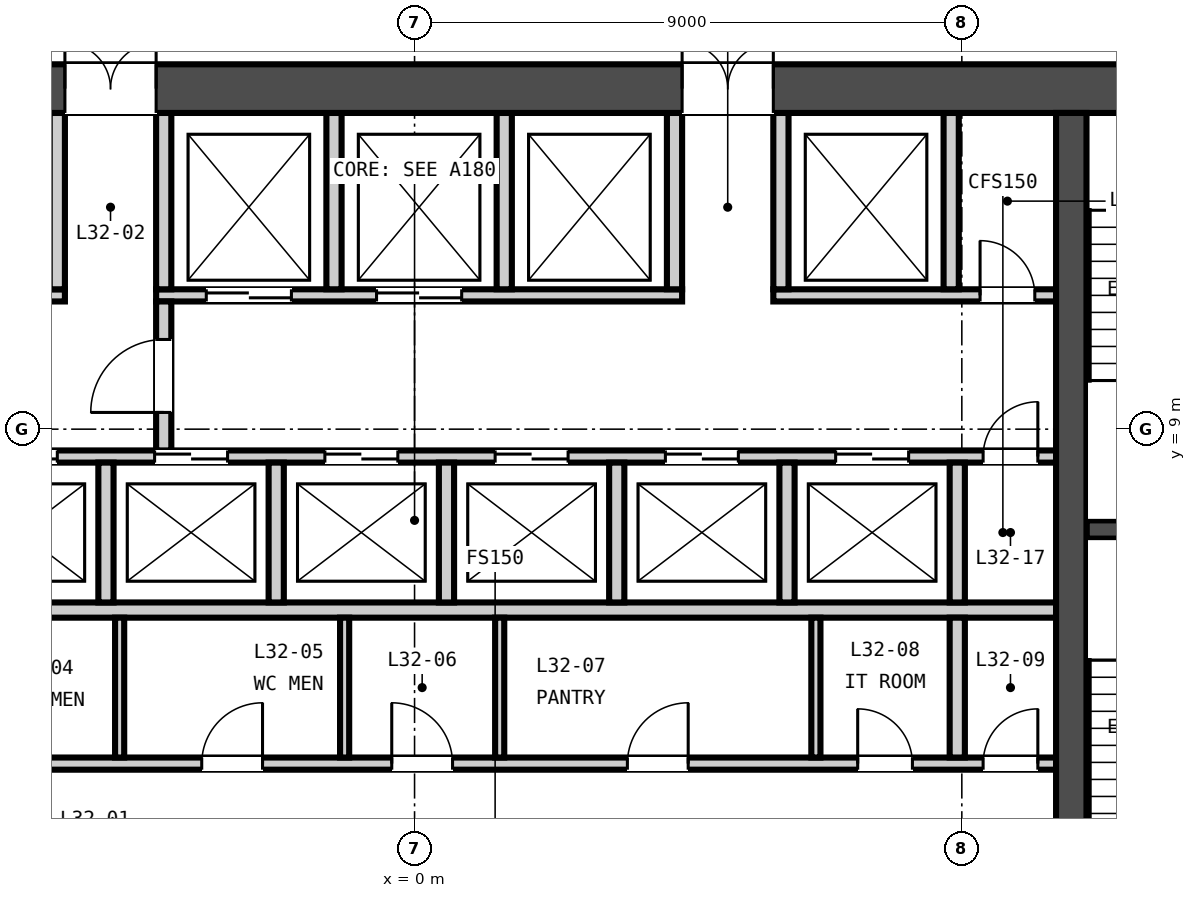
"""IFC4 building model, lengths in metres.
Left out: names, types, materials, properties, quantities, classifications, styles, units other than length and angle.
Written with IfcOpenShell. Run it as: python <this file> out.ifc"""

import sys

from ifc_helpers import new_model, si_unit, direction, frame, frame_2d, origin, place, context, subcontext, project, spatial, rectangle, extrude, element, fill, save


model = new_model("IFC4")
c1 = context("Model", 3, precision=1e-05, world=origin(), true_north=direction((0.0, 1.0)))
c2 = subcontext(c1, "Body", "Model", "MODEL_VIEW")
j1 = project(units=[si_unit("LENGTHUNIT", "METRE"), si_unit("PLANEANGLEUNIT", "RADIAN")], contexts=[c1])
p1 = place(None, origin())
s1 = spatial("IfcSite", under=j1, at=p1, CompositionType="ELEMENT")
p2 = place(p1, origin())
s2 = spatial("IfcBuilding", under=s1, at=p2, CompositionType="ELEMENT")
p3 = place(p2, frame((0.0, 0.0, 133.45)))
s3 = spatial("IfcBuildingStorey", under=s2, at=p3, CompositionType="ELEMENT", Elevation=133.45)
p4 = place(p3, frame((-15.0, 14.6, -0.15), z_axis=(0.0, 0.0, 1.0), x_axis=(1.0, 0.0, 0.0)))
e1 = element("IfcWall", 1, at=p4, inside=s3, PredefinedType="SOLIDWALL", context=c2, shape_type="SweptSolid", body=[
    extrude(rectangle(XDim=30.0, YDim=0.8, at=frame_2d((15.0, 0.0))), origin(), (0.0, 0.0, 1.0), 3.65),
])
p5 = place(p4, frame((9.25, 0.0, 0.15)))
e2 = element("IfcOpeningElement", 2, at=p5, cuts=e1, PredefinedType="OPENING", context=c2, shape_type="SweptSolid", body=[
    extrude(rectangle(XDim=1.5, YDim=2.1, at=frame_2d((0.75, 1.05))), frame((0.0, 0.41, 0.0), z_axis=(0.0, -1.0, 0.0), x_axis=(1.0, 0.0, 0.0)), (0.0, 0.0, 1.0), 0.82),
])
p6 = place(p4, frame((19.4, 0.0, 0.15)))
e3 = element("IfcOpeningElement", 3, at=p6, cuts=e1, PredefinedType="OPENING", context=c2, shape_type="SweptSolid", body=[
    extrude(rectangle(XDim=1.5, YDim=2.1, at=frame_2d((0.75, 1.05))), frame((0.0, 0.41, 0.0), z_axis=(0.0, -1.0, 0.0), x_axis=(1.0, 0.0, 0.0)), (0.0, 0.0, 1.0), 0.82),
])
p7 = place(p4, frame((1.5, 0.0, 0.15)))
e4 = element("IfcOpeningElement", 4, at=p7, cuts=e1, PredefinedType="OPENING", context=c2, shape_type="SweptSolid", body=[
    extrude(rectangle(XDim=1.2, YDim=2.1, at=frame_2d((0.6, 1.05))), frame((0.0, 0.41, 0.0), z_axis=(0.0, -1.0, 0.0), x_axis=(1.0, 0.0, 0.0)), (0.0, 0.0, 1.0), 0.82),
])
p8 = place(p4, frame((27.3, 0.0, 0.15)))
e5 = element("IfcOpeningElement", 5, at=p8, cuts=e1, PredefinedType="OPENING", context=c2, shape_type="SweptSolid", body=[
    extrude(rectangle(XDim=1.2, YDim=2.1, at=frame_2d((0.6, 1.05))), frame((0.0, 0.41, 0.0), z_axis=(0.0, -1.0, 0.0), x_axis=(1.0, 0.0, 0.0)), (0.0, 0.0, 1.0), 0.82),
])
p9 = place(p3, frame((10.8, 0.8, -0.15), z_axis=(0.0, 0.0, 1.0), x_axis=(0.0, 1.0, 0.0)))
e6 = element("IfcWall", 6, at=p9, inside=s3, PredefinedType="SOLIDWALL", context=c2, shape_type="SweptSolid", body=[
    extrude(rectangle(XDim=13.4, YDim=0.5, at=frame_2d((6.7, 0.0))), origin(), (0.0, 0.0, 1.0), 3.65),
])
p10 = place(p3, frame((-10.55, 3.5, 0.0), z_axis=(0.0, 0.0, 1.0), x_axis=(1.0, 0.0, 0.0)))
e7 = element("IfcWall", 7, at=p10, inside=s3, PredefinedType="PARTITIONING", context=c2, shape_type="SweptSolid", body=[
    extrude(rectangle(XDim=21.1, YDim=0.2, at=frame_2d((10.55, 0.0))), origin(), (0.0, 0.0, 1.0), 3.5),
])
p11 = place(p10, frame((2.312, 0.0, 0.0)))
e8 = element("IfcOpeningElement", 8, at=p11, cuts=e7, PredefinedType="OPENING", context=c2, shape_type="SweptSolid", body=[
    extrude(rectangle(XDim=1.0, YDim=2.1, at=frame_2d((0.5, 1.05))), frame((0.0, 0.11, 0.0), z_axis=(0.0, -1.0, 0.0), x_axis=(1.0, 0.0, 0.0)), (0.0, 0.0, 1.0), 0.22),
])
p12 = place(p10, frame((7.05, 0.0, 0.0)))
e9 = element("IfcOpeningElement", 9, at=p12, cuts=e7, PredefinedType="OPENING", context=c2, shape_type="SweptSolid", body=[
    extrude(rectangle(XDim=1.0, YDim=2.1, at=frame_2d((0.5, 1.05))), frame((0.0, 0.11, 0.0), z_axis=(0.0, -1.0, 0.0), x_axis=(1.0, 0.0, 0.0)), (0.0, 0.0, 1.0), 0.22),
])
p13 = place(p10, frame((10.175, 0.0, 0.0)))
e10 = element("IfcOpeningElement", 10, at=p13, cuts=e7, PredefinedType="OPENING", context=c2, shape_type="SweptSolid", body=[
    extrude(rectangle(XDim=1.0, YDim=2.1, at=frame_2d((0.5, 1.05))), frame((0.0, 0.11, 0.0), z_axis=(0.0, -1.0, 0.0), x_axis=(1.0, 0.0, 0.0)), (0.0, 0.0, 1.0), 0.22),
])
p14 = place(p10, frame((14.05, 0.0, 0.0)))
e11 = element("IfcOpeningElement", 11, at=p14, cuts=e7, PredefinedType="OPENING", context=c2, shape_type="SweptSolid", body=[
    extrude(rectangle(XDim=1.0, YDim=2.1, at=frame_2d((0.5, 1.05))), frame((0.0, 0.11, 0.0), z_axis=(0.0, -1.0, 0.0), x_axis=(1.0, 0.0, 0.0)), (0.0, 0.0, 1.0), 0.22),
])
p15 = place(p10, frame((17.837, 0.0, 0.0)))
e12 = element("IfcOpeningElement", 12, at=p15, cuts=e7, PredefinedType="OPENING", context=c2, shape_type="SweptSolid", body=[
    extrude(rectangle(XDim=0.9, YDim=2.1, at=frame_2d((0.45, 1.05))), frame((0.0, 0.11, 0.0), z_axis=(0.0, -1.0, 0.0), x_axis=(1.0, 0.0, 0.0)), (0.0, 0.0, 1.0), 0.22),
])
p16 = place(p10, frame((19.9, 0.0, 0.0)))
e13 = element("IfcOpeningElement", 13, at=p16, cuts=e7, PredefinedType="OPENING", context=c2, shape_type="SweptSolid", body=[
    extrude(rectangle(XDim=0.9, YDim=2.1, at=frame_2d((0.45, 1.05))), frame((0.0, 0.11, 0.0), z_axis=(0.0, -1.0, 0.0), x_axis=(1.0, 0.0, 0.0)), (0.0, 0.0, 1.0), 0.22),
])
p17 = place(p3, frame((-10.55, 6.025, 0.0), z_axis=(0.0, 0.0, 1.0), x_axis=(1.0, 0.0, 0.0)))
e14 = element("IfcWall", 14, at=p17, inside=s3, PredefinedType="PARTITIONING", context=c2, shape_type="SweptSolid", body=[
    extrude(rectangle(XDim=21.1, YDim=0.25, at=frame_2d((10.55, 0.0))), origin(), (0.0, 0.0, 1.0), 3.5),
])
p18 = place(p3, frame((-10.55, 8.55, 0.0), z_axis=(0.0, 0.0, 1.0), x_axis=(1.0, 0.0, 0.0)))
e15 = element("IfcWall", 15, at=p18, inside=s3, PredefinedType="PARTITIONING", context=c2, shape_type="SweptSolid", body=[
    extrude(rectangle(XDim=21.1, YDim=0.2, at=frame_2d((10.55, 0.0))), origin(), (0.0, 0.0, 1.0), 3.5),
])
p19 = place(p18, frame((0.675, 0.0, 0.0)))
e16 = element("IfcOpeningElement", 16, at=p19, cuts=e15, PredefinedType="OPENING", context=c2, shape_type="SweptSolid", body=[
    extrude(rectangle(XDim=1.2, YDim=2.1, at=frame_2d((0.6, 1.05))), frame((0.0, 0.11, 0.0), z_axis=(0.0, -1.0, 0.0), x_axis=(1.0, 0.0, 0.0)), (0.0, 0.0, 1.0), 0.22),
])
p20 = place(p18, frame((3.475, 0.0, 0.0)))
e17 = element("IfcOpeningElement", 17, at=p20, cuts=e15, PredefinedType="OPENING", context=c2, shape_type="SweptSolid", body=[
    extrude(rectangle(XDim=1.2, YDim=2.1, at=frame_2d((0.6, 1.05))), frame((0.0, 0.11, 0.0), z_axis=(0.0, -1.0, 0.0), x_axis=(1.0, 0.0, 0.0)), (0.0, 0.0, 1.0), 0.22),
])
p21 = place(p18, frame((6.275, 0.0, 0.0)))
e18 = element("IfcOpeningElement", 18, at=p21, cuts=e15, PredefinedType="OPENING", context=c2, shape_type="SweptSolid", body=[
    extrude(rectangle(XDim=1.2, YDim=2.1, at=frame_2d((0.6, 1.05))), frame((0.0, 0.11, 0.0), z_axis=(0.0, -1.0, 0.0), x_axis=(1.0, 0.0, 0.0)), (0.0, 0.0, 1.0), 0.22),
])
p22 = place(p18, frame((9.075, 0.0, 0.0)))
e19 = element("IfcOpeningElement", 19, at=p22, cuts=e15, PredefinedType="OPENING", context=c2, shape_type="SweptSolid", body=[
    extrude(rectangle(XDim=1.2, YDim=2.1, at=frame_2d((0.6, 1.05))), frame((0.0, 0.11, 0.0), z_axis=(0.0, -1.0, 0.0), x_axis=(1.0, 0.0, 0.0)), (0.0, 0.0, 1.0), 0.22),
])
p23 = place(p18, frame((11.875, 0.0, 0.0)))
e20 = element("IfcOpeningElement", 20, at=p23, cuts=e15, PredefinedType="OPENING", context=c2, shape_type="SweptSolid", body=[
    extrude(rectangle(XDim=1.2, YDim=2.1, at=frame_2d((0.6, 1.05))), frame((0.0, 0.11, 0.0), z_axis=(0.0, -1.0, 0.0), x_axis=(1.0, 0.0, 0.0)), (0.0, 0.0, 1.0), 0.22),
])
p24 = place(p18, frame((14.675, 0.0, 0.0)))
e21 = element("IfcOpeningElement", 21, at=p24, cuts=e15, PredefinedType="OPENING", context=c2, shape_type="SweptSolid", body=[
    extrude(rectangle(XDim=1.2, YDim=2.1, at=frame_2d((0.6, 1.05))), frame((0.0, 0.11, 0.0), z_axis=(0.0, -1.0, 0.0), x_axis=(1.0, 0.0, 0.0)), (0.0, 0.0, 1.0), 0.22),
])
p25 = place(p18, frame((17.475, 0.0, 0.0)))
e22 = element("IfcOpeningElement", 22, at=p25, cuts=e15, PredefinedType="OPENING", context=c2, shape_type="SweptSolid", body=[
    extrude(rectangle(XDim=1.2, YDim=2.1, at=frame_2d((0.6, 1.05))), frame((0.0, 0.11, 0.0), z_axis=(0.0, -1.0, 0.0), x_axis=(1.0, 0.0, 0.0)), (0.0, 0.0, 1.0), 0.22),
])
p26 = place(p18, frame((19.9, 0.0, 0.0)))
e23 = element("IfcOpeningElement", 23, at=p26, cuts=e15, PredefinedType="OPENING", context=c2, shape_type="SweptSolid", body=[
    extrude(rectangle(XDim=0.9, YDim=2.1, at=frame_2d((0.45, 1.05))), frame((0.0, 0.11, 0.0), z_axis=(0.0, -1.0, 0.0), x_axis=(1.0, 0.0, 0.0)), (0.0, 0.0, 1.0), 0.22),
])
p27 = place(p3, frame((-10.55, 11.2, 0.0), z_axis=(0.0, 0.0, 1.0), x_axis=(1.0, 0.0, 0.0)))
e24 = element("IfcWall", 24, at=p27, inside=s3, PredefinedType="PARTITIONING", context=c2, shape_type="SweptSolid", body=[
    extrude(rectangle(XDim=4.8, YDim=0.2, at=frame_2d((2.4, 0.0))), origin(), (0.0, 0.0, 1.0), 3.5),
])
p28 = place(p27, frame((0.525, 0.0, 0.0)))
e25 = element("IfcOpeningElement", 25, at=p28, cuts=e24, PredefinedType="OPENING", context=c2, shape_type="SweptSolid", body=[
    extrude(rectangle(XDim=1.1, YDim=2.1, at=frame_2d((0.55, 1.05))), frame((0.0, 0.11, 0.0), z_axis=(0.0, -1.0, 0.0), x_axis=(1.0, 0.0, 0.0)), (0.0, 0.0, 1.0), 0.22),
])
p29 = place(p27, frame((2.925, 0.0, 0.0)))
e26 = element("IfcOpeningElement", 26, at=p29, cuts=e24, PredefinedType="OPENING", context=c2, shape_type="SweptSolid", body=[
    extrude(rectangle(XDim=1.1, YDim=2.1, at=frame_2d((0.55, 1.05))), frame((0.0, 0.11, 0.0), z_axis=(0.0, -1.0, 0.0), x_axis=(1.0, 0.0, 0.0)), (0.0, 0.0, 1.0), 0.22),
])
p30 = place(p3, frame((-4.25, 11.2, 0.0), z_axis=(0.0, 0.0, 1.0), x_axis=(1.0, 0.0, 0.0)))
e27 = element("IfcWall", 27, at=p30, inside=s3, PredefinedType="PARTITIONING", context=c2, shape_type="SweptSolid", body=[
    extrude(rectangle(XDim=8.65, YDim=0.2, at=frame_2d((4.325, 0.0))), origin(), (0.0, 0.0, 1.0), 3.5),
])
p31 = place(p30, frame((0.825, 0.0, 0.0)))
e28 = element("IfcOpeningElement", 28, at=p31, cuts=e27, PredefinedType="OPENING", context=c2, shape_type="SweptSolid", body=[
    extrude(rectangle(XDim=1.4, YDim=2.1, at=frame_2d((0.7, 1.05))), frame((0.0, 0.11, 0.0), z_axis=(0.0, -1.0, 0.0), x_axis=(1.0, 0.0, 0.0)), (0.0, 0.0, 1.0), 0.22),
])
p32 = place(p30, frame((3.625, 0.0, 0.0)))
e29 = element("IfcOpeningElement", 29, at=p32, cuts=e27, PredefinedType="OPENING", context=c2, shape_type="SweptSolid", body=[
    extrude(rectangle(XDim=1.4, YDim=2.1, at=frame_2d((0.7, 1.05))), frame((0.0, 0.11, 0.0), z_axis=(0.0, -1.0, 0.0), x_axis=(1.0, 0.0, 0.0)), (0.0, 0.0, 1.0), 0.22),
])
p33 = place(p3, frame((5.9, 11.2, 0.0), z_axis=(0.0, 0.0, 1.0), x_axis=(1.0, 0.0, 0.0)))
e30 = element("IfcWall", 30, at=p33, inside=s3, PredefinedType="PARTITIONING", context=c2, shape_type="SweptSolid", body=[
    extrude(rectangle(XDim=4.65, YDim=0.2, at=frame_2d((2.325, 0.0))), origin(), (0.0, 0.0, 1.0), 3.5),
])
p34 = place(p33, frame((3.4, 0.0, 0.0)))
e31 = element("IfcOpeningElement", 31, at=p34, cuts=e30, PredefinedType="OPENING", context=c2, shape_type="SweptSolid", body=[
    extrude(rectangle(XDim=0.9, YDim=2.1, at=frame_2d((0.45, 1.05))), frame((0.0, 0.11, 0.0), z_axis=(0.0, -1.0, 0.0), x_axis=(1.0, 0.0, 0.0)), (0.0, 0.0, 1.0), 0.22),
])
p35 = place(p3, frame((-4.125, 8.65, 0.0), z_axis=(0.0, 0.0, 1.0), x_axis=(0.0, 1.0, 0.0)))
e32 = element("IfcWall", 32, at=p35, inside=s3, PredefinedType="PARTITIONING", context=c2, shape_type="SweptSolid", body=[
    extrude(rectangle(XDim=2.45, YDim=0.25, at=frame_2d((1.225, 0.0))), origin(), (0.0, 0.0, 1.0), 3.5),
])
p36 = place(p35, frame((0.625, 0.0, 0.0)))
e33 = element("IfcOpeningElement", 33, at=p36, cuts=e32, PredefinedType="OPENING", context=c2, shape_type="SweptSolid", body=[
    extrude(rectangle(XDim=1.2, YDim=2.1, at=frame_2d((0.6, 1.05))), frame((0.0, 0.135, 0.0), z_axis=(0.0, -1.0, 0.0), x_axis=(1.0, 0.0, 0.0)), (0.0, 0.0, 1.0), 0.27),
])
for number, where, z_axis, x_axis in (
    (34, (-4.85, 3.6, 0.0), (0.0, 0.0, 1.0), (0.0, 1.0, 0.0)),
    (35, (-1.15, 3.6, 0.0), (0.0, 0.0, 1.0), (0.0, 1.0, 0.0)),
    (36, (1.4, 3.6, 0.0), (0.0, 0.0, 1.0), (0.0, 1.0, 0.0)),
    (37, (6.6, 3.6, 0.0), (0.0, 0.0, 1.0), (0.0, 1.0, 0.0)),
):
    element("IfcWall", number, at=place(p3, frame(where, z_axis=z_axis, x_axis=x_axis)), inside=s3, PredefinedType="PARTITIONING", context=c2, shape_type="SweptSolid", body=[
        extrude(rectangle(XDim=2.3, YDim=0.15, at=frame_2d((1.15, 0.0))), origin(), (0.0, 0.0, 1.0), 3.5),
    ])
p37 = place(p3, frame((8.925, 3.6, 0.0), z_axis=(0.0, 0.0, 1.0), x_axis=(0.0, 1.0, 0.0)))
e38 = element("IfcWall", 38, at=p37, inside=s3, PredefinedType="PARTITIONING", context=c2, shape_type="SweptSolid", body=[
    extrude(rectangle(XDim=2.3, YDim=0.25, at=frame_2d((1.15, 0.0))), origin(), (0.0, 0.0, 1.0), 3.5),
])
for number, where, z_axis, x_axis in (
    (39, (-5.075, 6.15, 0.0), (0.0, 0.0, 1.0), (0.0, 1.0, 0.0)),
    (40, (-2.275, 6.15, 0.0), (0.0, 0.0, 1.0), (0.0, 1.0, 0.0)),
    (41, (0.525, 6.15, 0.0), (0.0, 0.0, 1.0), (0.0, 1.0, 0.0)),
    (42, (3.325, 6.15, 0.0), (0.0, 0.0, 1.0), (0.0, 1.0, 0.0)),
    (43, (6.125, 6.15, 0.0), (0.0, 0.0, 1.0), (0.0, 1.0, 0.0)),
    (44, (8.925, 6.15, 0.0), (0.0, 0.0, 1.0), (0.0, 1.0, 0.0)),
):
    element("IfcWall", number, at=place(p3, frame(where, z_axis=z_axis, x_axis=x_axis)), inside=s3, PredefinedType="PARTITIONING", context=c2, shape_type="SweptSolid", body=[
        extrude(rectangle(XDim=2.3, YDim=0.25, at=frame_2d((1.15, 0.0))), origin(), (0.0, 0.0, 1.0), 3.5),
    ])
for number, where, z_axis, x_axis in (
    (45, (-5.875, 11.3, 0.0), (0.0, 0.0, 1.0), (0.0, 1.0, 0.0)),
    (46, (-4.125, 11.3, 0.0), (0.0, 0.0, 1.0), (0.0, 1.0, 0.0)),
    (47, (-1.325, 11.3, 0.0), (0.0, 0.0, 1.0), (0.0, 1.0, 0.0)),
    (48, (1.475, 11.3, 0.0), (0.0, 0.0, 1.0), (0.0, 1.0, 0.0)),
    (49, (4.275, 11.3, 0.0), (0.0, 0.0, 1.0), (0.0, 1.0, 0.0)),
    (50, (6.025, 11.3, 0.0), (0.0, 0.0, 1.0), (0.0, 1.0, 0.0)),
    (51, (8.825, 11.3, 0.0), (0.0, 0.0, 1.0), (0.0, 1.0, 0.0)),
):
    element("IfcWall", number, at=place(p3, frame(where, z_axis=z_axis, x_axis=x_axis)), inside=s3, PredefinedType="PARTITIONING", context=c2, shape_type="SweptSolid", body=[
        extrude(rectangle(XDim=2.9, YDim=0.25, at=frame_2d((1.45, 0.0))), origin(), (0.0, 0.0, 1.0), 3.5),
    ])
p38 = place(p3, frame((11.05, 7.35, 0.0), z_axis=(0.0, 0.0, 1.0), x_axis=(1.0, 0.0, 0.0)))
e52 = element("IfcWall", 52, at=p38, inside=s3, PredefinedType="SOLIDWALL", context=c2, shape_type="SweptSolid", body=[
    extrude(rectangle(XDim=2.95, YDim=0.3, at=frame_2d((1.475, 0.0))), origin(), (0.0, 0.0, 1.0), 3.5),
])
p39 = place(p36, origin())
e53 = element("IfcDoor", 53, at=p39, inside=s3, OperationType="SINGLE_SWING_LEFT", PredefinedType="DOOR", context=c2, shape_type="SweptSolid", body=[
    extrude(rectangle(XDim=1.2, YDim=2.1, at=frame_2d((0.6, 1.05))), frame((0.0, 0.025, 0.0), z_axis=(0.0, -1.0, 0.0), x_axis=(1.0, 0.0, 0.0)), (0.0, 0.0, 1.0), 0.05),
])
fill(e33, e53)
p40 = place(p12, origin())
e54 = element("IfcDoor", 54, at=p40, inside=s3, OperationType="SINGLE_SWING_RIGHT", PredefinedType="DOOR", context=c2, shape_type="SweptSolid", body=[
    extrude(rectangle(XDim=1.0, YDim=2.1, at=frame_2d((0.5, 1.05))), frame((0.0, 0.025, 0.0), z_axis=(0.0, -1.0, 0.0), x_axis=(1.0, 0.0, 0.0)), (0.0, 0.0, 1.0), 0.05),
])
fill(e9, e54)
p41 = place(p13, origin())
e55 = element("IfcDoor", 55, at=p41, inside=s3, OperationType="SINGLE_SWING_LEFT", PredefinedType="DOOR", context=c2, shape_type="SweptSolid", body=[
    extrude(rectangle(XDim=1.0, YDim=2.1, at=frame_2d((0.5, 1.05))), frame((0.0, 0.025, 0.0), z_axis=(0.0, -1.0, 0.0), x_axis=(1.0, 0.0, 0.0)), (0.0, 0.0, 1.0), 0.05),
])
fill(e10, e55)
p42 = place(p14, origin())
e56 = element("IfcDoor", 56, at=p42, inside=s3, OperationType="SINGLE_SWING_RIGHT", PredefinedType="DOOR", context=c2, shape_type="SweptSolid", body=[
    extrude(rectangle(XDim=1.0, YDim=2.1, at=frame_2d((0.5, 1.05))), frame((0.0, 0.025, 0.0), z_axis=(0.0, -1.0, 0.0), x_axis=(1.0, 0.0, 0.0)), (0.0, 0.0, 1.0), 0.05),
])
fill(e11, e56)
p43 = place(p15, origin())
e57 = element("IfcDoor", 57, at=p43, inside=s3, OperationType="SINGLE_SWING_LEFT", PredefinedType="DOOR", context=c2, shape_type="SweptSolid", body=[
    extrude(rectangle(XDim=0.9, YDim=2.1, at=frame_2d((0.45, 1.05))), frame((0.0, 0.025, 0.0), z_axis=(0.0, -1.0, 0.0), x_axis=(1.0, 0.0, 0.0)), (0.0, 0.0, 1.0), 0.05),
])
fill(e12, e57)
p44 = place(p16, origin())
e58 = element("IfcDoor", 58, at=p44, inside=s3, OperationType="SINGLE_SWING_RIGHT", PredefinedType="DOOR", context=c2, shape_type="SweptSolid", body=[
    extrude(rectangle(XDim=0.9, YDim=2.1, at=frame_2d((0.45, 1.05))), frame((0.0, 0.025, 0.0), z_axis=(0.0, -1.0, 0.0), x_axis=(1.0, 0.0, 0.0)), (0.0, 0.0, 1.0), 0.05),
])
fill(e13, e58)
p45 = place(p20, origin())
e59 = element("IfcDoor", 59, at=p45, inside=s3, OperationType="DOUBLE_DOOR_SLIDING", PredefinedType="DOOR", context=c2, shape_type="SweptSolid", body=[
    extrude(rectangle(XDim=1.2, YDim=2.1, at=frame_2d((0.6, 1.05))), frame((0.0, 0.025, 0.0), z_axis=(0.0, -1.0, 0.0), x_axis=(1.0, 0.0, 0.0)), (0.0, 0.0, 1.0), 0.05),
])
fill(e17, e59)
p46 = place(p21, origin())
e60 = element("IfcDoor", 60, at=p46, inside=s3, OperationType="DOUBLE_DOOR_SLIDING", PredefinedType="DOOR", context=c2, shape_type="SweptSolid", body=[
    extrude(rectangle(XDim=1.2, YDim=2.1, at=frame_2d((0.6, 1.05))), frame((0.0, 0.025, 0.0), z_axis=(0.0, -1.0, 0.0), x_axis=(1.0, 0.0, 0.0)), (0.0, 0.0, 1.0), 0.05),
])
fill(e18, e60)
p47 = place(p22, origin())
e61 = element("IfcDoor", 61, at=p47, inside=s3, OperationType="DOUBLE_DOOR_SLIDING", PredefinedType="DOOR", context=c2, shape_type="SweptSolid", body=[
    extrude(rectangle(XDim=1.2, YDim=2.1, at=frame_2d((0.6, 1.05))), frame((0.0, 0.025, 0.0), z_axis=(0.0, -1.0, 0.0), x_axis=(1.0, 0.0, 0.0)), (0.0, 0.0, 1.0), 0.05),
])
fill(e19, e61)
p48 = place(p23, origin())
e62 = element("IfcDoor", 62, at=p48, inside=s3, OperationType="DOUBLE_DOOR_SLIDING", PredefinedType="DOOR", context=c2, shape_type="SweptSolid", body=[
    extrude(rectangle(XDim=1.2, YDim=2.1, at=frame_2d((0.6, 1.05))), frame((0.0, 0.025, 0.0), z_axis=(0.0, -1.0, 0.0), x_axis=(1.0, 0.0, 0.0)), (0.0, 0.0, 1.0), 0.05),
])
fill(e20, e62)
p49 = place(p24, origin())
e63 = element("IfcDoor", 63, at=p49, inside=s3, OperationType="DOUBLE_DOOR_SLIDING", PredefinedType="DOOR", context=c2, shape_type="SweptSolid", body=[
    extrude(rectangle(XDim=1.2, YDim=2.1, at=frame_2d((0.6, 1.05))), frame((0.0, 0.025, 0.0), z_axis=(0.0, -1.0, 0.0), x_axis=(1.0, 0.0, 0.0)), (0.0, 0.0, 1.0), 0.05),
])
fill(e21, e63)
p50 = place(p25, origin())
e64 = element("IfcDoor", 64, at=p50, inside=s3, OperationType="DOUBLE_DOOR_SLIDING", PredefinedType="DOOR", context=c2, shape_type="SweptSolid", body=[
    extrude(rectangle(XDim=1.2, YDim=2.1, at=frame_2d((0.6, 1.05))), frame((0.0, 0.025, 0.0), z_axis=(0.0, -1.0, 0.0), x_axis=(1.0, 0.0, 0.0)), (0.0, 0.0, 1.0), 0.05),
])
fill(e22, e64)
p51 = place(p26, origin())
e65 = element("IfcDoor", 65, at=p51, inside=s3, OperationType="SINGLE_SWING_RIGHT", PredefinedType="DOOR", context=c2, shape_type="SweptSolid", body=[
    extrude(rectangle(XDim=0.9, YDim=2.1, at=frame_2d((0.45, 1.05))), frame((0.0, 0.025, 0.0), z_axis=(0.0, -1.0, 0.0), x_axis=(1.0, 0.0, 0.0)), (0.0, 0.0, 1.0), 0.05),
])
fill(e23, e65)
p52 = place(p31, origin())
e66 = element("IfcDoor", 66, at=p52, inside=s3, OperationType="DOUBLE_DOOR_SLIDING", PredefinedType="DOOR", context=c2, shape_type="SweptSolid", body=[
    extrude(rectangle(XDim=1.4, YDim=2.1, at=frame_2d((0.7, 1.05))), frame((0.0, 0.025, 0.0), z_axis=(0.0, -1.0, 0.0), x_axis=(1.0, 0.0, 0.0)), (0.0, 0.0, 1.0), 0.05),
])
fill(e28, e66)
p53 = place(p32, origin())
e67 = element("IfcDoor", 67, at=p53, inside=s3, OperationType="DOUBLE_DOOR_SLIDING", PredefinedType="DOOR", context=c2, shape_type="SweptSolid", body=[
    extrude(rectangle(XDim=1.4, YDim=2.1, at=frame_2d((0.7, 1.05))), frame((0.0, 0.025, 0.0), z_axis=(0.0, -1.0, 0.0), x_axis=(1.0, 0.0, 0.0)), (0.0, 0.0, 1.0), 0.05),
])
fill(e29, e67)
p54 = place(p34, origin())
e68 = element("IfcDoor", 68, at=p54, inside=s3, OperationType="SINGLE_SWING_LEFT", PredefinedType="DOOR", context=c2, shape_type="SweptSolid", body=[
    extrude(rectangle(XDim=0.9, YDim=2.1, at=frame_2d((0.45, 1.05))), frame((0.0, 0.025, 0.0), z_axis=(0.0, -1.0, 0.0), x_axis=(1.0, 0.0, 0.0)), (0.0, 0.0, 1.0), 0.05),
])
fill(e31, e68)
p55 = place(p5, origin())
e69 = element("IfcDoor", 69, at=p55, inside=s3, OperationType="DOUBLE_DOOR_SINGLE_SWING", PredefinedType="DOOR", context=c2, shape_type="SweptSolid", body=[
    extrude(rectangle(XDim=1.5, YDim=2.1, at=frame_2d((0.75, 1.05))), frame((0.0, 0.025, 0.0), z_axis=(0.0, -1.0, 0.0), x_axis=(1.0, 0.0, 0.0)), (0.0, 0.0, 1.0), 0.05),
])
fill(e2, e69)
p56 = place(p6, origin())
e70 = element("IfcDoor", 70, at=p56, inside=s3, OperationType="DOUBLE_DOOR_SINGLE_SWING", PredefinedType="DOOR", context=c2, shape_type="SweptSolid", body=[
    extrude(rectangle(XDim=1.5, YDim=2.1, at=frame_2d((0.75, 1.05))), frame((0.0, 0.025, 0.0), z_axis=(0.0, -1.0, 0.0), x_axis=(1.0, 0.0, 0.0)), (0.0, 0.0, 1.0), 0.05),
])
fill(e3, e70)
save(model, sys.argv[1])
